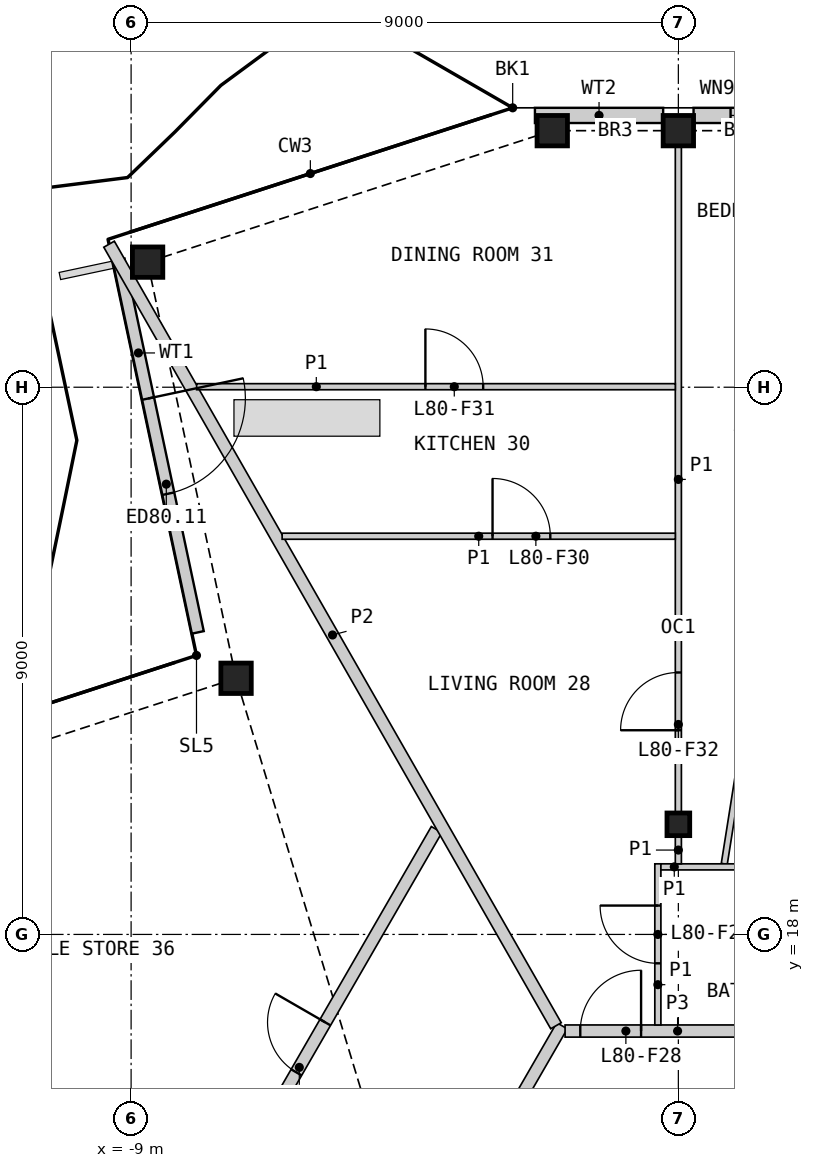
"""IFC4 building model, lengths in metres.
Left out: names, types, materials, properties, quantities, classifications, styles, units other than length and angle.
Written with IfcOpenShell. Run it as: python <this file> out.ifc"""

import sys

from ifc_helpers import new_model, si_unit, direction, frame, frame_2d, origin, origin_2d, place, context, subcontext, project, spatial, rectangle, hollow_rectangle, i_section, extrude, element, fill, save


model = new_model("IFC4")
c1 = context("Model", 3, precision=1e-05, world=origin(), true_north=direction((0.0, 1.0)))
c2 = subcontext(c1, "Body", "Model", "MODEL_VIEW")
j1 = project(units=[si_unit("LENGTHUNIT", "METRE"), si_unit("PLANEANGLEUNIT", "RADIAN")], contexts=[c1])
p1 = place(None, origin())
s1 = spatial("IfcSite", under=j1, at=p1, CompositionType="ELEMENT")
p2 = place(p1, origin())
s2 = spatial("IfcBuilding", under=s1, at=p2, CompositionType="ELEMENT")
p3 = place(p2, frame((0.0, 0.0, 361.0)))
s3 = spatial("IfcBuildingStorey", under=s2, at=p3, CompositionType="ELEMENT", Elevation=361.0)
for number, where, z_axis, x_axis in (
    (1, (0.0, 31.219, 0.0), (0.0, 0.0, 1.0), (1.0, 0.0, 0.0)),
    (2, (-2.074, 31.219, 0.0), (0.0, 0.0, 1.0), (1.0, 0.0, 0.0)),
    (3, (-8.729, 29.057, 0.0), (0.0, 0.0, 1.0), (1.0, 0.0, 0.0)),
    (4, (-7.274, 22.213, 0.0), (0.0, 0.0, 1.0), (1.0, 0.0, 0.0)),
):
    element("IfcColumn", number, at=place(p3, frame(where, z_axis=z_axis, x_axis=x_axis)), inside=s3, PredefinedType="COLUMN", context=c2, shape_type="SweptSolid", body=[
        extrude(hollow_rectangle(XDim=0.5, YDim=0.5, WallThickness=0.03, at=origin_2d()), origin(), (0.0, 0.0, 1.0), 3.4),
    ])
p4 = place(p3, frame((0.0, 19.811, 0.0), z_axis=(0.0, 0.0, 1.0), x_axis=(1.0, 0.0, 0.0)))
e5 = element("IfcColumn", 5, at=p4, inside=s3, PredefinedType="COLUMN", context=c2, shape_type="SweptSolid", body=[
    extrude(i_section(OverallWidth=0.374, OverallDepth=0.372, WebThickness=0.016, FlangeThickness=0.026, at=origin_2d()), origin(), (0.0, 0.0, 1.0), 3.4),
])
p5 = place(p3, frame((2.638, 31.47, 0.0), z_axis=(0.0, 0.0, 1.0), x_axis=(-1.0, 0.0, 0.0)))
e6 = element("IfcWall", 6, at=p5, inside=s3, PredefinedType="SOLIDWALL", context=c2, shape_type="SweptSolid", body=[
    extrude(rectangle(XDim=2.388, YDim=0.25, at=frame_2d((1.194, 0.0))), origin(), (0.0, 0.0, 1.0), 2.634),
])
p6 = place(p5, frame((0.88, 0.0, 0.6)))
e7 = element("IfcOpeningElement", 7, at=p6, cuts=e6, PredefinedType="OPENING", context=c2, shape_type="SweptSolid", body=[
    extrude(rectangle(XDim=0.9, YDim=1.8, at=frame_2d((0.45, 0.9))), frame((0.0, 0.135, 0.0), z_axis=(0.0, -1.0, 0.0), x_axis=(1.0, 0.0, 0.0)), (0.0, 0.0, 1.0), 0.27),
])
p7 = place(p3, frame((-0.25, 31.47, 0.0), z_axis=(0.0, 0.0, 1.0), x_axis=(-1.0, 0.0, 0.0)))
e8 = element("IfcWall", 8, at=p7, inside=s3, PredefinedType="SOLIDWALL", context=c2, shape_type="SweptSolid", body=[
    extrude(rectangle(XDim=2.109, YDim=0.25, at=frame_2d((1.054, 0.0))), origin(), (0.0, 0.0, 1.0), 2.634),
])
p8 = place(p3, frame((-9.206, 29.096, 0.0), z_axis=(0.0, 0.0, 1.0), x_axis=(0.207889514624, -0.978152314167, 0.0)))
e9 = element("IfcWall", 9, at=p8, inside=s3, PredefinedType="SOLIDWALL", context=c2, shape_type="SweptSolid", body=[
    extrude(rectangle(XDim=6.265, YDim=0.2, at=frame_2d((3.133, 0.0))), origin(), (0.0, 0.0, 1.0), 2.634),
])
p9 = place(p8, frame((2.333, 0.0, 0.0)))
e10 = element("IfcOpeningElement", 10, at=p9, cuts=e9, PredefinedType="OPENING", context=c2, shape_type="SweptSolid", body=[
    extrude(rectangle(XDim=1.6, YDim=2.25, at=frame_2d((0.8, 1.125))), frame((0.0, 0.11, 0.0), z_axis=(0.0, -1.0, 0.0), x_axis=(1.0, 0.0, 0.0)), (0.0, 0.0, 1.0), 0.22),
])
p10 = place(p3, frame((-4.176, 12.579, 0.0), z_axis=(0.0, 0.0, 1.0), x_axis=(0.499974648164, 0.866040040179, 0.0)))
e11 = element("IfcWall", 11, at=p10, inside=s3, PredefinedType="PARTITIONING", context=c2, shape_type="SweptSolid", body=[
    extrude(rectangle(XDim=4.525, YDim=0.2, at=frame_2d((2.263, 0.0))), origin(), (0.0, 0.0, 1.0), 3.1),
])
p11 = place(p3, frame((-1.863, 16.411, 0.0), z_axis=(0.0, 0.0, 1.0), x_axis=(1.0, 0.0, 0.0)))
e12 = element("IfcWall", 12, at=p11, inside=s3, PredefinedType="PARTITIONING", context=c2, shape_type="SweptSolid", body=[
    extrude(rectangle(XDim=3.701, YDim=0.2, at=frame_2d((1.851, 0.0))), origin(), (0.0, 0.0, 1.0), 3.1),
])
p12 = place(p11, frame((0.25, 0.0, 0.0)))
e13 = element("IfcOpeningElement", 13, at=p12, cuts=e12, PredefinedType="OPENING", context=c2, shape_type="SweptSolid", body=[
    extrude(rectangle(XDim=1.0, YDim=2.1, at=frame_2d((0.5, 1.05))), frame((0.0, 0.11, 0.0), z_axis=(0.0, -1.0, 0.0), x_axis=(1.0, 0.0, 0.0)), (0.0, 0.0, 1.0), 0.22),
])
p13 = place(p3, frame((-11.473, 6.74, 0.0), z_axis=(0.0, 0.0, 1.0), x_axis=(0.499993542657, 0.866029131901, 0.0)))
e14 = element("IfcWall", 14, at=p13, inside=s3, PredefinedType="PARTITIONING", context=c2, shape_type="SweptSolid", body=[
    extrude(rectangle(XDim=14.994, YDim=0.2, at=frame_2d((7.497, 0.0))), origin(), (0.0, 0.0, 1.0), 2.33),
])
p14 = place(p13, frame((10.383, 0.0, 0.0)))
e15 = element("IfcOpeningElement", 15, at=p14, cuts=e14, PredefinedType="OPENING", context=c2, shape_type="SweptSolid", body=[
    extrude(rectangle(XDim=0.95, YDim=2.1, at=frame_2d((0.475, 1.05))), frame((0.0, 0.11, 0.0), z_axis=(0.0, -1.0, 0.0), x_axis=(1.0, 0.0, 0.0)), (0.0, 0.0, 1.0), 0.22),
])
p15 = place(p3, frame((-9.362, 29.352, 0.0), z_axis=(0.0, 0.0, 1.0), x_axis=(0.496351997927, -0.868121359116, 0.0)))
e16 = element("IfcWall", 16, at=p15, inside=s3, PredefinedType="PARTITIONING", context=c2, shape_type="SweptSolid", body=[
    extrude(rectangle(XDim=14.807, YDim=0.2, at=frame_2d((7.404, 0.0))), origin(), (0.0, 0.0, 1.0), 2.33),
])
p16 = place(p3, frame((0.755, 19.16, 0.0), z_axis=(0.0, 0.0, 1.0), x_axis=(0.15643456532, 0.987688324712, 0.0)))
e17 = element("IfcWall", 17, at=p16, inside=s3, PredefinedType="PARTITIONING", context=c2, shape_type="SweptSolid", body=[
    extrude(rectangle(XDim=12.59, YDim=0.1, at=frame_2d((6.295, 0.0))), origin(), (0.0, 0.0, 1.0), 2.33),
])
p17 = place(p16, frame((7.074, 0.0, 0.0)))
e18 = element("IfcOpeningElement", 18, at=p17, cuts=e17, PredefinedType="OPENING", context=c2, shape_type="SweptSolid", body=[
    extrude(rectangle(XDim=0.95, YDim=2.1, at=frame_2d((0.475, 1.05))), frame((0.0, 0.06, 0.0), z_axis=(0.0, -1.0, 0.0), x_axis=(1.0, 0.0, 0.0)), (0.0, 0.0, 1.0), 0.12),
])
p18 = place(p3, frame((0.0, 20.008, 0.0), z_axis=(0.0, 0.0, 1.0), x_axis=(0.0, 1.0, 0.0)))
e19 = element("IfcWall", 19, at=p18, inside=s3, PredefinedType="PARTITIONING", context=c2, shape_type="SweptSolid", body=[
    extrude(rectangle(XDim=10.951, YDim=0.1, at=frame_2d((5.476, 0.0))), origin(), (0.0, 0.0, 1.0), 2.33),
])
p19 = place(p18, frame((1.35, 0.0, 0.0)))
e20 = element("IfcOpeningElement", 20, at=p19, cuts=e19, PredefinedType="OPENING", context=c2, shape_type="SweptSolid", body=[
    extrude(rectangle(XDim=0.95, YDim=2.1, at=frame_2d((0.475, 1.05))), frame((0.0, 0.06, 0.0), z_axis=(0.0, -1.0, 0.0), x_axis=(1.0, 0.0, 0.0)), (0.0, 0.0, 1.0), 0.12),
])
p20 = place(p3, frame((-7.922, 27.009, 0.0), z_axis=(0.0, 0.0, 1.0), x_axis=(1.0, 0.0, 0.0)))
e21 = element("IfcWall", 21, at=p20, inside=s3, PredefinedType="PARTITIONING", context=c2, shape_type="SweptSolid", body=[
    extrude(rectangle(XDim=7.872, YDim=0.1, at=frame_2d((3.936, 0.0))), origin(), (0.0, 0.0, 1.0), 2.33),
])
p21 = place(p20, frame((3.762, 0.0, 0.0)))
e22 = element("IfcOpeningElement", 22, at=p21, cuts=e21, PredefinedType="OPENING", context=c2, shape_type="SweptSolid", body=[
    extrude(rectangle(XDim=0.95, YDim=2.1, at=frame_2d((0.475, 1.05))), frame((0.0, 0.06, 0.0), z_axis=(0.0, -1.0, 0.0), x_axis=(1.0, 0.0, 0.0)), (0.0, 0.0, 1.0), 0.12),
])
p22 = place(p3, frame((-6.516, 24.549, 0.0), z_axis=(0.0, 0.0, 1.0), x_axis=(1.0, 0.0, 0.0)))
e23 = element("IfcWall", 23, at=p22, inside=s3, PredefinedType="PARTITIONING", context=c2, shape_type="SweptSolid", body=[
    extrude(rectangle(XDim=6.466, YDim=0.1, at=frame_2d((3.233, 0.0))), origin(), (0.0, 0.0, 1.0), 2.33),
])
p23 = place(p22, frame((3.46, 0.0, 0.0)))
e24 = element("IfcOpeningElement", 24, at=p23, cuts=e23, PredefinedType="OPENING", context=c2, shape_type="SweptSolid", body=[
    extrude(rectangle(XDim=0.95, YDim=2.1, at=frame_2d((0.475, 1.05))), frame((0.0, 0.06, 0.0), z_axis=(0.0, -1.0, 0.0), x_axis=(1.0, 0.0, 0.0)), (0.0, 0.0, 1.0), 0.12),
])
p24 = place(p3, frame((-0.337, 16.511, 0.0), z_axis=(0.0, 0.0, 1.0), x_axis=(0.0, 1.0, 0.0)))
e25 = element("IfcWall", 25, at=p24, inside=s3, PredefinedType="PARTITIONING", context=c2, shape_type="SweptSolid", body=[
    extrude(rectangle(XDim=2.65, YDim=0.1, at=frame_2d((1.325, 0.0))), origin(), (0.0, 0.0, 1.0), 2.33),
])
p25 = place(p24, frame((1.014, 0.0, 0.0)))
e26 = element("IfcOpeningElement", 26, at=p25, cuts=e25, PredefinedType="OPENING", context=c2, shape_type="SweptSolid", body=[
    extrude(rectangle(XDim=0.95, YDim=2.1, at=frame_2d((0.475, 1.05))), frame((0.0, 0.06, 0.0), z_axis=(0.0, -1.0, 0.0), x_axis=(1.0, 0.0, 0.0)), (0.0, 0.0, 1.0), 0.12),
])
p26 = place(p3, frame((-0.287, 19.111, 0.0), z_axis=(0.0, 0.0, 1.0), x_axis=(1.0, 0.0, 0.0)))
e27 = element("IfcWall", 27, at=p26, inside=s3, PredefinedType="PARTITIONING", context=c2, shape_type="SweptSolid", body=[
    extrude(rectangle(XDim=2.2, YDim=0.1, at=frame_2d((1.1, 0.0))), origin(), (0.0, 0.0, 1.0), 2.33),
])
p27 = place(p3, frame((0.0, 19.161, 0.0), z_axis=(0.0, 0.0, 1.0), x_axis=(0.0, 1.0, 0.0)))
e28 = element("IfcWall", 28, at=p27, inside=s3, PredefinedType="PARTITIONING", context=c2, shape_type="SweptSolid", body=[
    extrude(rectangle(XDim=0.453, YDim=0.1, at=frame_2d((0.227, 0.0))), origin(), (0.0, 0.0, 1.0), 2.33),
])
p28 = place(p6, origin())
e29 = element("IfcWindow", 29, at=p28, inside=s3, PartitioningType="SINGLE_PANEL", PredefinedType="WINDOW", context=c2, shape_type="SweptSolid", body=[
    extrude(rectangle(XDim=0.9, YDim=1.8, at=frame_2d((0.45, 0.9))), frame((0.0, 0.03, 0.0), z_axis=(0.0, -1.0, 0.0), x_axis=(1.0, 0.0, 0.0)), (0.0, 0.0, 1.0), 0.06),
])
fill(e7, e29)
p29 = place(p9, origin())
e30 = element("IfcDoor", 30, at=p29, inside=s3, OperationType="DOUBLE_DOOR_SINGLE_SWING", PredefinedType="DOOR", context=c2, shape_type="SweptSolid", body=[
    extrude(rectangle(XDim=1.6, YDim=2.25, at=frame_2d((0.8, 1.125))), frame((0.0, 0.025, 0.0), z_axis=(0.0, -1.0, 0.0), x_axis=(1.0, 0.0, 0.0)), (0.0, 0.0, 1.0), 0.05),
])
fill(e10, e30)
p30 = place(p12, origin())
e31 = element("IfcDoor", 31, at=p30, inside=s3, OperationType="SINGLE_SWING_RIGHT", PredefinedType="DOOR", context=c2, shape_type="SweptSolid", body=[
    extrude(rectangle(XDim=1.0, YDim=2.1, at=frame_2d((0.5, 1.05))), frame((0.0, 0.025, 0.0), z_axis=(0.0, -1.0, 0.0), x_axis=(1.0, 0.0, 0.0)), (0.0, 0.0, 1.0), 0.05),
])
fill(e13, e31)
p31 = place(p25, origin())
e32 = element("IfcDoor", 32, at=p31, inside=s3, OperationType="SINGLE_SWING_RIGHT", PredefinedType="DOOR", context=c2, shape_type="SweptSolid", body=[
    extrude(rectangle(XDim=0.95, YDim=2.1, at=frame_2d((0.475, 1.05))), frame((0.0, 0.025, 0.0), z_axis=(0.0, -1.0, 0.0), x_axis=(1.0, 0.0, 0.0)), (0.0, 0.0, 1.0), 0.05),
])
fill(e26, e32)
p32 = place(p23, origin())
e33 = element("IfcDoor", 33, at=p32, inside=s3, OperationType="SINGLE_SWING_LEFT", PredefinedType="DOOR", context=c2, shape_type="SweptSolid", body=[
    extrude(rectangle(XDim=0.95, YDim=2.1, at=frame_2d((0.475, 1.05))), frame((0.0, 0.025, 0.0), z_axis=(0.0, -1.0, 0.0), x_axis=(1.0, 0.0, 0.0)), (0.0, 0.0, 1.0), 0.05),
])
fill(e24, e33)
p33 = place(p21, origin())
e34 = element("IfcDoor", 34, at=p33, inside=s3, OperationType="SINGLE_SWING_LEFT", PredefinedType="DOOR", context=c2, shape_type="SweptSolid", body=[
    extrude(rectangle(XDim=0.95, YDim=2.1, at=frame_2d((0.475, 1.05))), frame((0.0, 0.025, 0.0), z_axis=(0.0, -1.0, 0.0), x_axis=(1.0, 0.0, 0.0)), (0.0, 0.0, 1.0), 0.05),
])
fill(e22, e34)
p34 = place(p19, origin())
e35 = element("IfcDoor", 35, at=p34, inside=s3, OperationType="SINGLE_SWING_LEFT", PredefinedType="DOOR", context=c2, shape_type="SweptSolid", body=[
    extrude(rectangle(XDim=0.95, YDim=2.1, at=frame_2d((0.475, 1.05))), frame((0.0, 0.025, 0.0), z_axis=(0.0, -1.0, 0.0), x_axis=(1.0, 0.0, 0.0)), (0.0, 0.0, 1.0), 0.05),
])
fill(e20, e35)
p35 = place(p14, origin())
e36 = element("IfcDoor", 36, at=p35, inside=s3, OperationType="SINGLE_SWING_RIGHT", PredefinedType="DOOR", context=c2, shape_type="SweptSolid", body=[
    extrude(rectangle(XDim=0.95, YDim=2.1, at=frame_2d((0.475, 1.05))), frame((0.0, 0.025, 0.0), z_axis=(0.0, -1.0, 0.0), x_axis=(1.0, 0.0, 0.0)), (0.0, 0.0, 1.0), 0.05),
])
fill(e15, e36)
save(model, sys.argv[1])
